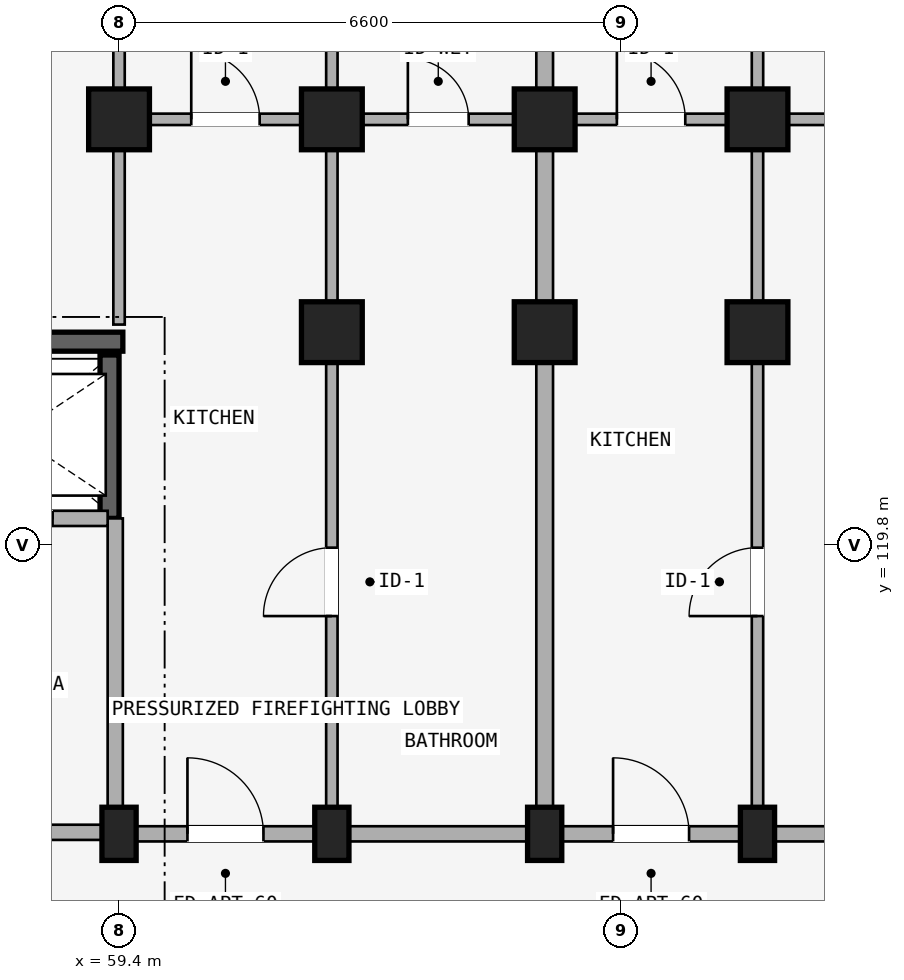
"""IFC4 building model, lengths in metres.
Left out: names, types, materials, properties, quantities, classifications, styles, units other than length and angle.
Written with IfcOpenShell. Run it as: python <this file> out.ifc"""

import sys

from ifc_helpers import new_model, si_unit, direction, frame, frame_2d, origin, origin_2d, place, context, subcontext, project, spatial, rectangle, extrude, element, fill, save


model = new_model("IFC4")
c1 = context("Model", 3, precision=1e-05, world=origin(), true_north=direction((0.0, 1.0)))
c2 = subcontext(c1, "Body", "Model", "MODEL_VIEW")
j1 = project(units=[si_unit("LENGTHUNIT", "METRE"), si_unit("PLANEANGLEUNIT", "RADIAN")], contexts=[c1])
p1 = place(None, origin())
s1 = spatial("IfcSite", under=j1, at=p1, CompositionType="ELEMENT")
p2 = place(p1, origin())
s2 = spatial("IfcBuilding", under=s1, at=p2, CompositionType="ELEMENT")
p3 = place(p2, frame((0.0, 0.0, 15.0)))
s3 = spatial("IfcBuildingStorey", under=s2, at=p3, CompositionType="ELEMENT", Elevation=15.0)
p4 = place(p3, frame((56.65, 122.475, 0.0), z_axis=(0.0, 0.0, 1.0), x_axis=(1.0, 0.0, 0.0)))
e1 = element("IfcWall", 1, at=p4, inside=s3, PredefinedType="SHEAR", context=c2, shape_type="SweptSolid", body=[
    extrude(rectangle(XDim=2.8, YDim=0.25, at=frame_2d((1.4, 0.0))), origin(), (0.0, 0.0, 1.0), 2.93),
])
p5 = place(p3, frame((59.275, 120.15, 0.0), z_axis=(0.0, 0.0, 1.0), x_axis=(0.0, 1.0, 0.0)))
e2 = element("IfcWall", 2, at=p5, inside=s3, PredefinedType="SHEAR", context=c2, shape_type="SweptSolid", body=[
    extrude(rectangle(XDim=2.15, YDim=0.25, at=frame_2d((1.075, 0.0))), origin(), (0.0, 0.0, 1.0), 2.93),
])
p6 = place(p3, frame((59.4, 116.0, 0.0), z_axis=(0.0, 0.0, 1.0), x_axis=(1.0, 0.0, 0.0)))
e3 = element("IfcColumn", 3, at=p6, inside=s3, PredefinedType="COLUMN", context=c2, shape_type="SweptSolid", body=[
    extrude(rectangle(XDim=0.45, YDim=0.7, at=origin_2d()), origin(), (0.0, 0.0, 1.0), 2.93),
])
p7 = place(p3, frame((59.4, 125.4, 0.0), z_axis=(0.0, 0.0, 1.0), x_axis=(1.0, 0.0, 0.0)))
e4 = element("IfcColumn", 4, at=p7, inside=s3, PredefinedType="COLUMN", context=c2, shape_type="SweptSolid", body=[
    extrude(rectangle(XDim=0.8, YDim=0.8, at=origin_2d()), origin(), (0.0, 0.0, 1.0), 2.93),
])
p8 = place(p3, frame((62.2, 116.0, 0.0), z_axis=(0.0, 0.0, 1.0), x_axis=(1.0, 0.0, 0.0)))
e5 = element("IfcColumn", 5, at=p8, inside=s3, PredefinedType="COLUMN", context=c2, shape_type="SweptSolid", body=[
    extrude(rectangle(XDim=0.45, YDim=0.7, at=origin_2d()), origin(), (0.0, 0.0, 1.0), 2.93),
])
for number, where, z_axis, x_axis in (
    (6, (62.2, 122.6, 0.0), (0.0, 0.0, 1.0), (1.0, 0.0, 0.0)),
    (7, (62.2, 125.4, 0.0), (0.0, 0.0, 1.0), (1.0, 0.0, 0.0)),
):
    element("IfcColumn", number, at=place(p3, frame(where, z_axis=z_axis, x_axis=x_axis)), inside=s3, PredefinedType="COLUMN", context=c2, shape_type="SweptSolid", body=[
        extrude(rectangle(XDim=0.8, YDim=0.8, at=origin_2d()), origin(), (0.0, 0.0, 1.0), 2.93),
    ])
p9 = place(p3, frame((65.0, 116.0, 0.0), z_axis=(0.0, 0.0, 1.0), x_axis=(1.0, 0.0, 0.0)))
e8 = element("IfcColumn", 8, at=p9, inside=s3, PredefinedType="COLUMN", context=c2, shape_type="SweptSolid", body=[
    extrude(rectangle(XDim=0.45, YDim=0.7, at=origin_2d()), origin(), (0.0, 0.0, 1.0), 2.93),
])
for number, where, z_axis, x_axis in (
    (9, (65.0, 122.6, 0.0), (0.0, 0.0, 1.0), (1.0, 0.0, 0.0)),
    (10, (65.0, 125.4, 0.0), (0.0, 0.0, 1.0), (1.0, 0.0, 0.0)),
):
    element("IfcColumn", number, at=place(p3, frame(where, z_axis=z_axis, x_axis=x_axis)), inside=s3, PredefinedType="COLUMN", context=c2, shape_type="SweptSolid", body=[
        extrude(rectangle(XDim=0.8, YDim=0.8, at=origin_2d()), origin(), (0.0, 0.0, 1.0), 2.93),
    ])
p10 = place(p3, frame((67.8, 116.0, 0.0), z_axis=(0.0, 0.0, 1.0), x_axis=(1.0, 0.0, 0.0)))
e11 = element("IfcColumn", 11, at=p10, inside=s3, PredefinedType="COLUMN", context=c2, shape_type="SweptSolid", body=[
    extrude(rectangle(XDim=0.45, YDim=0.7, at=origin_2d()), origin(), (0.0, 0.0, 1.0), 2.93),
])
for number, where, z_axis, x_axis in (
    (12, (67.8, 122.6, 0.0), (0.0, 0.0, 1.0), (1.0, 0.0, 0.0)),
    (13, (67.8, 125.4, 0.0), (0.0, 0.0, 1.0), (1.0, 0.0, 0.0)),
):
    element("IfcColumn", number, at=place(p3, frame(where, z_axis=z_axis, x_axis=x_axis)), inside=s3, PredefinedType="COLUMN", context=c2, shape_type="SweptSolid", body=[
        extrude(rectangle(XDim=0.8, YDim=0.8, at=origin_2d()), origin(), (0.0, 0.0, 1.0), 2.93),
    ])
p11 = place(p3, frame((53.7, 116.02, 0.0), z_axis=(0.0, 0.0, 1.0), x_axis=(1.0, 0.0, 0.0)))
e14 = element("IfcWall", 14, at=p11, inside=s3, PredefinedType="STANDARD", context=c2, shape_type="SweptSolid", body=[
    extrude(rectangle(XDim=5.65, YDim=0.2, at=frame_2d((2.825, 0.0))), origin(), (0.0, 0.0, 1.0), 2.372),
])
p12 = place(p11, frame((1.923, 0.0, 0.0)))
e15 = element("IfcOpeningElement", 15, at=p12, cuts=e14, PredefinedType="OPENING", context=c2, shape_type="SweptSolid", body=[
    extrude(rectangle(XDim=1.24, YDim=2.15, at=frame_2d((0.62, 1.075))), frame((0.0, 0.11, 0.0), z_axis=(0.0, -1.0, 0.0), x_axis=(1.0, 0.0, 0.0)), (0.0, 0.0, 1.0), 0.22),
])
p13 = place(p3, frame((59.35, 116.02, 0.0), z_axis=(0.0, 0.0, 1.0), x_axis=(0.0, 1.0, 0.0)))
e16 = element("IfcWall", 16, at=p13, inside=s3, PredefinedType="STANDARD", context=c2, shape_type="SweptSolid", body=[
    extrude(rectangle(XDim=4.13, YDim=0.2, at=frame_2d((2.065, 0.0))), origin(), (0.0, 0.0, 1.0), 2.372),
])
p14 = place(p3, frame((56.7, 120.15, 0.0), z_axis=(0.0, 0.0, 1.0), x_axis=(1.0, 0.0, 0.0)))
e17 = element("IfcWall", 17, at=p14, inside=s3, PredefinedType="STANDARD", context=c2, shape_type="SweptSolid", body=[
    extrude(rectangle(XDim=2.55, YDim=0.2, at=frame_2d((1.275, 0.0))), origin(), (0.0, 0.0, 1.0), 2.372),
])
p15 = place(p14, frame((0.725, 0.0, 0.0)))
e18 = element("IfcOpeningElement", 18, at=p15, cuts=e17, PredefinedType="OPENING", context=c2, shape_type="SweptSolid", body=[
    extrude(rectangle(XDim=1.1, YDim=2.15, at=frame_2d((0.55, 1.075))), frame((0.0, 0.11, 0.0), z_axis=(0.0, -1.0, 0.0), x_axis=(1.0, 0.0, 0.0)), (0.0, 0.0, 1.0), 0.22),
])
p16 = place(p3, frame((59.4, 116.0, 0.0), z_axis=(0.0, 0.0, 1.0), x_axis=(1.0, 0.0, 0.0)))
e19 = element("IfcWall", 19, at=p16, inside=s3, PredefinedType="STANDARD", context=c2, shape_type="SweptSolid", body=[
    extrude(rectangle(XDim=2.8, YDim=0.2, at=frame_2d((1.4, 0.0))), origin(), (0.0, 0.0, 1.0), 2.372),
])
p17 = place(p16, frame((0.9, 0.0, 0.0)))
e20 = element("IfcOpeningElement", 20, at=p17, cuts=e19, PredefinedType="OPENING", context=c2, shape_type="SweptSolid", body=[
    extrude(rectangle(XDim=1.0, YDim=2.15, at=frame_2d((0.5, 1.075))), frame((0.0, 0.11, 0.0), z_axis=(0.0, -1.0, 0.0), x_axis=(1.0, 0.0, 0.0)), (0.0, 0.0, 1.0), 0.22),
])
p18 = place(p3, frame((59.48, 125.4, 0.0), z_axis=(0.0, 0.0, 1.0), x_axis=(1.0, 0.0, 0.0)))
e21 = element("IfcWall", 21, at=p18, inside=s3, PredefinedType="PLUMBINGWALL", context=c2, shape_type="SweptSolid", body=[
    extrude(rectangle(XDim=2.64, YDim=0.15, at=frame_2d((1.32, 0.0))), origin(), (0.0, 0.0, 1.0), 2.372),
])
p19 = place(p18, frame((0.87, 0.0, 0.0)))
e22 = element("IfcOpeningElement", 22, at=p19, cuts=e21, PredefinedType="OPENING", context=c2, shape_type="SweptSolid", body=[
    extrude(rectangle(XDim=0.9, YDim=2.1, at=frame_2d((0.45, 1.05))), frame((0.0, 0.085, 0.0), z_axis=(0.0, -1.0, 0.0), x_axis=(1.0, 0.0, 0.0)), (0.0, 0.0, 1.0), 0.17),
])
p20 = place(p3, frame((62.2, 116.0, 0.0), z_axis=(0.0, 0.0, 1.0), x_axis=(1.0, 0.0, 0.0)))
e23 = element("IfcWall", 23, at=p20, inside=s3, PredefinedType="STANDARD", context=c2, shape_type="SweptSolid", body=[
    extrude(rectangle(XDim=2.8, YDim=0.2, at=frame_2d((1.4, 0.0))), origin(), (0.0, 0.0, 1.0), 2.372),
])
p21 = place(p3, frame((62.28, 125.4, 0.0), z_axis=(0.0, 0.0, 1.0), x_axis=(1.0, 0.0, 0.0)))
e24 = element("IfcWall", 24, at=p21, inside=s3, PredefinedType="PLUMBINGWALL", context=c2, shape_type="SweptSolid", body=[
    extrude(rectangle(XDim=2.64, YDim=0.15, at=frame_2d((1.32, 0.0))), origin(), (0.0, 0.0, 1.0), 2.372),
])
p22 = place(p21, frame((0.92, 0.0, 0.0)))
e25 = element("IfcOpeningElement", 25, at=p22, cuts=e24, PredefinedType="OPENING", context=c2, shape_type="SweptSolid", body=[
    extrude(rectangle(XDim=0.8, YDim=2.1, at=frame_2d((0.4, 1.05))), frame((0.0, 0.085, 0.0), z_axis=(0.0, -1.0, 0.0), x_axis=(1.0, 0.0, 0.0)), (0.0, 0.0, 1.0), 0.17),
])
p23 = place(p3, frame((65.0, 116.0, 0.0), z_axis=(0.0, 0.0, 1.0), x_axis=(1.0, 0.0, 0.0)))
e26 = element("IfcWall", 26, at=p23, inside=s3, PredefinedType="STANDARD", context=c2, shape_type="SweptSolid", body=[
    extrude(rectangle(XDim=2.8, YDim=0.2, at=frame_2d((1.4, 0.0))), origin(), (0.0, 0.0, 1.0), 2.372),
])
p24 = place(p23, frame((0.9, 0.0, 0.0)))
e27 = element("IfcOpeningElement", 27, at=p24, cuts=e26, PredefinedType="OPENING", context=c2, shape_type="SweptSolid", body=[
    extrude(rectangle(XDim=1.0, YDim=2.15, at=frame_2d((0.5, 1.075))), frame((0.0, 0.11, 0.0), z_axis=(0.0, -1.0, 0.0), x_axis=(1.0, 0.0, 0.0)), (0.0, 0.0, 1.0), 0.22),
])
p25 = place(p3, frame((65.08, 125.4, 0.0), z_axis=(0.0, 0.0, 1.0), x_axis=(1.0, 0.0, 0.0)))
e28 = element("IfcWall", 28, at=p25, inside=s3, PredefinedType="PLUMBINGWALL", context=c2, shape_type="SweptSolid", body=[
    extrude(rectangle(XDim=2.64, YDim=0.15, at=frame_2d((1.32, 0.0))), origin(), (0.0, 0.0, 1.0), 2.372),
])
p26 = place(p25, frame((0.87, 0.0, 0.0)))
e29 = element("IfcOpeningElement", 29, at=p26, cuts=e28, PredefinedType="OPENING", context=c2, shape_type="SweptSolid", body=[
    extrude(rectangle(XDim=0.9, YDim=2.1, at=frame_2d((0.45, 1.05))), frame((0.0, 0.085, 0.0), z_axis=(0.0, -1.0, 0.0), x_axis=(1.0, 0.0, 0.0)), (0.0, 0.0, 1.0), 0.17),
])
p27 = place(p3, frame((67.8, 116.0, 0.0), z_axis=(0.0, 0.0, 1.0), x_axis=(1.0, 0.0, 0.0)))
e30 = element("IfcWall", 30, at=p27, inside=s3, PredefinedType="STANDARD", context=c2, shape_type="SweptSolid", body=[
    extrude(rectangle(XDim=2.8, YDim=0.2, at=frame_2d((1.4, 0.0))), origin(), (0.0, 0.0, 1.0), 2.372),
])
p28 = place(p3, frame((67.88, 125.4, 0.0), z_axis=(0.0, 0.0, 1.0), x_axis=(1.0, 0.0, 0.0)))
e31 = element("IfcWall", 31, at=p28, inside=s3, PredefinedType="PLUMBINGWALL", context=c2, shape_type="SweptSolid", body=[
    extrude(rectangle(XDim=2.64, YDim=0.15, at=frame_2d((1.32, 0.0))), origin(), (0.0, 0.0, 1.0), 2.372),
])
p29 = place(p28, frame((0.92, 0.0, 0.0)))
e32 = element("IfcOpeningElement", 32, at=p29, cuts=e31, PredefinedType="OPENING", context=c2, shape_type="SweptSolid", body=[
    extrude(rectangle(XDim=0.8, YDim=2.1, at=frame_2d((0.4, 1.05))), frame((0.0, 0.085, 0.0), z_axis=(0.0, -1.0, 0.0), x_axis=(1.0, 0.0, 0.0)), (0.0, 0.0, 1.0), 0.17),
])
p30 = place(p3, frame((59.4, 122.7, 0.0), z_axis=(0.0, 0.0, 1.0), x_axis=(0.0, 1.0, 0.0)))
e33 = element("IfcWall", 33, at=p30, inside=s3, PredefinedType="PARTITIONING", context=c2, shape_type="SweptSolid", body=[
    extrude(rectangle(XDim=10.82, YDim=0.15, at=frame_2d((5.41, 0.0))), origin(), (0.0, 0.0, 1.0), 2.372),
])
p31 = place(p30, frame((3.7, 0.0, 0.0)))
e34 = element("IfcOpeningElement", 34, at=p31, cuts=e33, PredefinedType="OPENING", context=c2, shape_type="SweptSolid", body=[
    extrude(rectangle(XDim=0.8, YDim=2.1, at=frame_2d((0.4, 1.05))), frame((0.0, 0.085, 0.0), z_axis=(0.0, -1.0, 0.0), x_axis=(1.0, 0.0, 0.0)), (0.0, 0.0, 1.0), 0.17),
])
p32 = place(p3, frame((62.2, 116.05, 0.0), z_axis=(0.0, 0.0, 1.0), x_axis=(0.0, 1.0, 0.0)))
e35 = element("IfcWall", 35, at=p32, inside=s3, PredefinedType="PARTITIONING", context=c2, shape_type="SweptSolid", body=[
    extrude(rectangle(XDim=6.53, YDim=0.15, at=frame_2d((3.265, 0.0))), origin(), (0.0, 0.0, 1.0), 2.372),
])
p33 = place(p32, frame((2.815, 0.0, 0.0)))
e36 = element("IfcOpeningElement", 36, at=p33, cuts=e35, PredefinedType="OPENING", context=c2, shape_type="SweptSolid", body=[
    extrude(rectangle(XDim=0.9, YDim=2.1, at=frame_2d((0.45, 1.05))), frame((0.0, 0.085, 0.0), z_axis=(0.0, -1.0, 0.0), x_axis=(1.0, 0.0, 0.0)), (0.0, 0.0, 1.0), 0.17),
])
p34 = place(p3, frame((62.2, 122.7, 0.0), z_axis=(0.0, 0.0, 1.0), x_axis=(0.0, 1.0, 0.0)))
e37 = element("IfcWall", 37, at=p34, inside=s3, PredefinedType="PARTITIONING", context=c2, shape_type="SweptSolid", body=[
    extrude(rectangle(XDim=10.82, YDim=0.15, at=frame_2d((5.41, 0.0))), origin(), (0.0, 0.0, 1.0), 2.372),
])
p35 = place(p34, frame((3.7, 0.0, 0.0)))
e38 = element("IfcOpeningElement", 38, at=p35, cuts=e37, PredefinedType="OPENING", context=c2, shape_type="SweptSolid", body=[
    extrude(rectangle(XDim=0.8, YDim=2.1, at=frame_2d((0.4, 1.05))), frame((0.0, 0.085, 0.0), z_axis=(0.0, -1.0, 0.0), x_axis=(1.0, 0.0, 0.0)), (0.0, 0.0, 1.0), 0.17),
])
p36 = place(p3, frame((65.0, 116.05, 0.0), z_axis=(0.0, 0.0, 1.0), x_axis=(0.0, 1.0, 0.0)))
e39 = element("IfcWall", 39, at=p36, inside=s3, PredefinedType="STANDARD", context=c2, shape_type="SweptSolid", body=[
    extrude(rectangle(XDim=6.53, YDim=0.22, at=frame_2d((3.265, 0.0))), origin(), (0.0, 0.0, 1.0), 2.372),
])
p37 = place(p3, frame((65.0, 122.7, 0.0), z_axis=(0.0, 0.0, 1.0), x_axis=(0.0, 1.0, 0.0)))
e40 = element("IfcWall", 40, at=p37, inside=s3, PredefinedType="STANDARD", context=c2, shape_type="SweptSolid", body=[
    extrude(rectangle(XDim=10.82, YDim=0.22, at=frame_2d((5.41, 0.0))), origin(), (0.0, 0.0, 1.0), 2.372),
])
p38 = place(p3, frame((67.8, 116.05, 0.0), z_axis=(0.0, 0.0, 1.0), x_axis=(0.0, 1.0, 0.0)))
e41 = element("IfcWall", 41, at=p38, inside=s3, PredefinedType="PARTITIONING", context=c2, shape_type="SweptSolid", body=[
    extrude(rectangle(XDim=6.53, YDim=0.15, at=frame_2d((3.265, 0.0))), origin(), (0.0, 0.0, 1.0), 2.372),
])
p39 = place(p38, frame((2.815, 0.0, 0.0)))
e42 = element("IfcOpeningElement", 42, at=p39, cuts=e41, PredefinedType="OPENING", context=c2, shape_type="SweptSolid", body=[
    extrude(rectangle(XDim=0.9, YDim=2.1, at=frame_2d((0.45, 1.05))), frame((0.0, 0.085, 0.0), z_axis=(0.0, -1.0, 0.0), x_axis=(1.0, 0.0, 0.0)), (0.0, 0.0, 1.0), 0.17),
])
p40 = place(p3, frame((67.8, 122.7, 0.0), z_axis=(0.0, 0.0, 1.0), x_axis=(0.0, 1.0, 0.0)))
e43 = element("IfcWall", 43, at=p40, inside=s3, PredefinedType="PARTITIONING", context=c2, shape_type="SweptSolid", body=[
    extrude(rectangle(XDim=10.82, YDim=0.15, at=frame_2d((5.41, 0.0))), origin(), (0.0, 0.0, 1.0), 2.372),
])
p41 = place(p40, frame((3.7, 0.0, 0.0)))
e44 = element("IfcOpeningElement", 44, at=p41, cuts=e43, PredefinedType="OPENING", context=c2, shape_type="SweptSolid", body=[
    extrude(rectangle(XDim=0.8, YDim=2.1, at=frame_2d((0.4, 1.05))), frame((0.0, 0.085, 0.0), z_axis=(0.0, -1.0, 0.0), x_axis=(1.0, 0.0, 0.0)), (0.0, 0.0, 1.0), 0.17),
])
p42 = place(p15, origin())
e45 = element("IfcDoor", 45, at=p42, inside=s3, OperationType="SLIDING_TO_LEFT", PredefinedType="DOOR", context=c2, shape_type="SweptSolid", body=[
    extrude(rectangle(XDim=1.1, YDim=2.15, at=frame_2d((0.55, 1.075))), frame((0.0, 0.025, 0.0), z_axis=(0.0, -1.0, 0.0), x_axis=(1.0, 0.0, 0.0)), (0.0, 0.0, 1.0), 0.05),
])
fill(e18, e45)
p43 = place(p19, frame((0.9, 0.0, 0.0), z_axis=(0.0, 0.0, 1.0), x_axis=(-1.0, 0.0, 0.0)))
e46 = element("IfcDoor", 46, at=p43, inside=s3, OperationType="SINGLE_SWING_RIGHT", PredefinedType="DOOR", context=c2, shape_type="SweptSolid", body=[
    extrude(rectangle(XDim=0.9, YDim=2.1, at=frame_2d((0.45, 1.05))), frame((0.0, 0.025, 0.0), z_axis=(0.0, -1.0, 0.0), x_axis=(1.0, 0.0, 0.0)), (0.0, 0.0, 1.0), 0.05),
])
fill(e22, e46)
p44 = place(p17, origin())
e47 = element("IfcDoor", 47, at=p44, inside=s3, OperationType="SINGLE_SWING_LEFT", PredefinedType="DOOR", context=c2, shape_type="SweptSolid", body=[
    extrude(rectangle(XDim=1.0, YDim=2.15, at=frame_2d((0.5, 1.075))), frame((0.0, 0.025, 0.0), z_axis=(0.0, -1.0, 0.0), x_axis=(1.0, 0.0, 0.0)), (0.0, 0.0, 1.0), 0.05),
])
fill(e20, e47)
p45 = place(p22, frame((0.8, 0.0, 0.0), z_axis=(0.0, 0.0, 1.0), x_axis=(-1.0, 0.0, 0.0)))
e48 = element("IfcDoor", 48, at=p45, inside=s3, OperationType="SINGLE_SWING_RIGHT", PredefinedType="DOOR", context=c2, shape_type="SweptSolid", body=[
    extrude(rectangle(XDim=0.8, YDim=2.1, at=frame_2d((0.4, 1.05))), frame((0.0, 0.025, 0.0), z_axis=(0.0, -1.0, 0.0), x_axis=(1.0, 0.0, 0.0)), (0.0, 0.0, 1.0), 0.05),
])
fill(e25, e48)
p46 = place(p26, frame((0.9, 0.0, 0.0), z_axis=(0.0, 0.0, 1.0), x_axis=(-1.0, 0.0, 0.0)))
e49 = element("IfcDoor", 49, at=p46, inside=s3, OperationType="SINGLE_SWING_RIGHT", PredefinedType="DOOR", context=c2, shape_type="SweptSolid", body=[
    extrude(rectangle(XDim=0.9, YDim=2.1, at=frame_2d((0.45, 1.05))), frame((0.0, 0.025, 0.0), z_axis=(0.0, -1.0, 0.0), x_axis=(1.0, 0.0, 0.0)), (0.0, 0.0, 1.0), 0.05),
])
fill(e29, e49)
p47 = place(p24, origin())
e50 = element("IfcDoor", 50, at=p47, inside=s3, OperationType="SINGLE_SWING_LEFT", PredefinedType="DOOR", context=c2, shape_type="SweptSolid", body=[
    extrude(rectangle(XDim=1.0, YDim=2.15, at=frame_2d((0.5, 1.075))), frame((0.0, 0.025, 0.0), z_axis=(0.0, -1.0, 0.0), x_axis=(1.0, 0.0, 0.0)), (0.0, 0.0, 1.0), 0.05),
])
fill(e27, e50)
p48 = place(p33, origin())
e51 = element("IfcDoor", 51, at=p48, inside=s3, OperationType="SINGLE_SWING_LEFT", PredefinedType="DOOR", context=c2, shape_type="SweptSolid", body=[
    extrude(rectangle(XDim=0.9, YDim=2.1, at=frame_2d((0.45, 1.05))), frame((0.0, 0.025, 0.0), z_axis=(0.0, -1.0, 0.0), x_axis=(1.0, 0.0, 0.0)), (0.0, 0.0, 1.0), 0.05),
])
fill(e36, e51)
p49 = place(p39, frame((0.9, 0.0, 0.0), z_axis=(0.0, 0.0, 1.0), x_axis=(-1.0, 0.0, 0.0)))
e52 = element("IfcDoor", 52, at=p49, inside=s3, OperationType="SINGLE_SWING_RIGHT", PredefinedType="DOOR", context=c2, shape_type="SweptSolid", body=[
    extrude(rectangle(XDim=0.9, YDim=2.1, at=frame_2d((0.45, 1.05))), frame((0.0, 0.025, 0.0), z_axis=(0.0, -1.0, 0.0), x_axis=(1.0, 0.0, 0.0)), (0.0, 0.0, 1.0), 0.05),
])
fill(e42, e52)
save(model, sys.argv[1])
